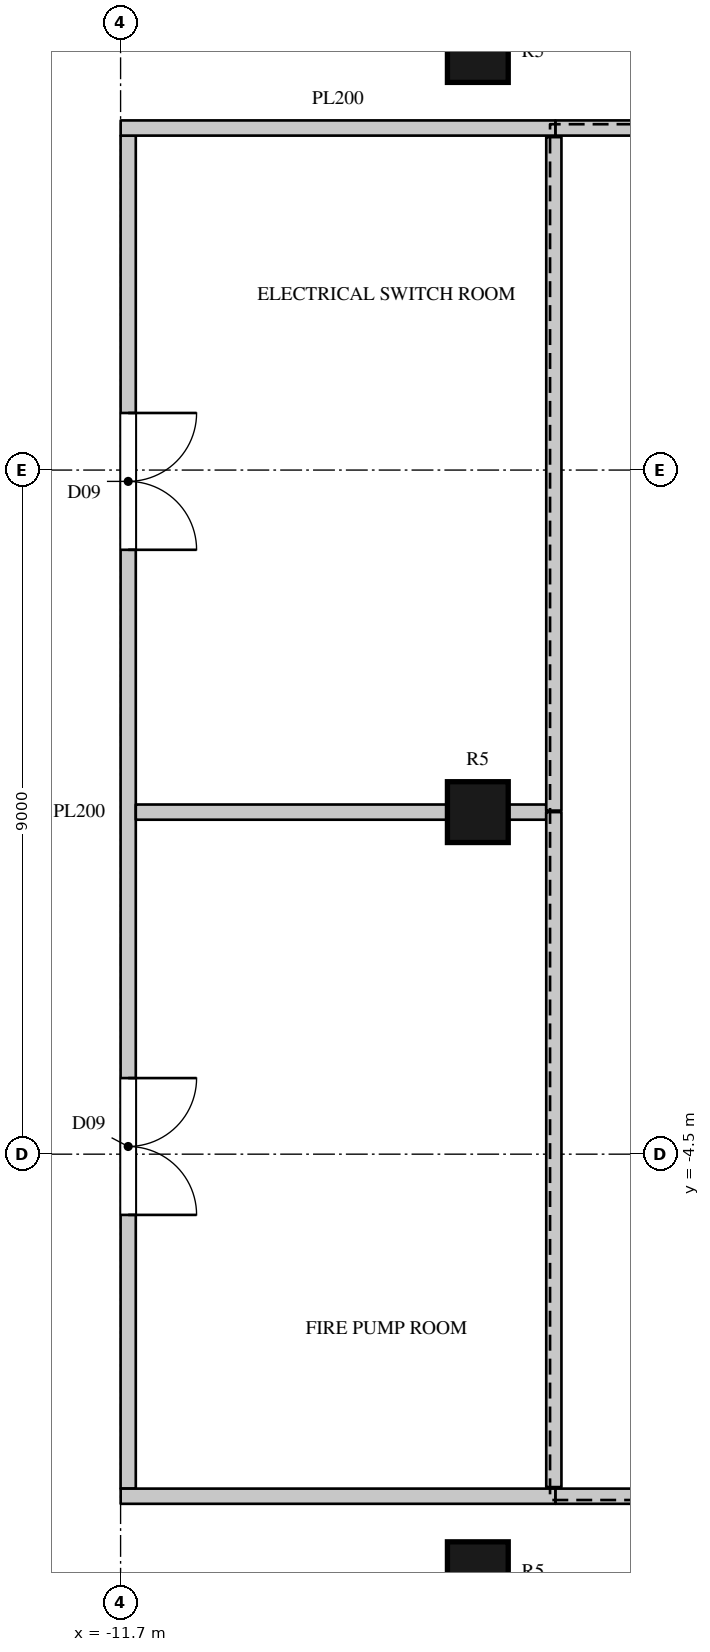
"""IFC4 building model, lengths in metres.
Left out: names, types, materials, properties, quantities, classifications, styles, units other than length and angle.
Written with IfcOpenShell. Run it as: python <this file> out.ifc"""

import sys

from ifc_helpers import new_model, si_unit, direction, frame, frame_2d, origin, origin_2d, place, context, subcontext, project, spatial, rectangle, circle, extrude, element, fill, save


model = new_model("IFC4")
c1 = context("Model", 3, precision=1e-05, world=origin(), true_north=direction((0.0, 1.0)))
c2 = subcontext(c1, "Body", "Model", "MODEL_VIEW")
j1 = project(units=[si_unit("LENGTHUNIT", "METRE"), si_unit("PLANEANGLEUNIT", "RADIAN")], contexts=[c1])
p1 = place(None, origin())
s1 = spatial("IfcSite", under=j1, at=p1, CompositionType="ELEMENT")
p2 = place(p1, origin())
s2 = spatial("IfcBuilding", under=s1, at=p2, CompositionType="ELEMENT")
p3 = place(p2, frame((0.0, 0.0, 347.0)))
s3 = spatial("IfcBuildingStorey", under=s2, at=p3, CompositionType="ELEMENT", Elevation=347.0)
for number, where, z_axis, x_axis in (
    (1, (-7.0, -10.0, 0.0), (0.0, 0.0, 1.0), (1.0, 0.0, 0.0)),
    (2, (-7.0, 0.0, 0.0), (0.0, 0.0, 1.0), (1.0, 0.0, 0.0)),
    (3, (-7.0, 10.0, 0.0), (0.0, 0.0, 1.0), (1.0, 0.0, 0.0)),
):
    element("IfcColumn", number, at=place(p3, frame(where, z_axis=z_axis, x_axis=x_axis)), inside=s3, PredefinedType="COLUMN", context=c2, shape_type="SweptSolid", body=[
        extrude(circle(Radius=0.4, at=origin_2d()), origin(), (0.0, 0.0, 1.0), 4.0),
    ])
for number, where, z_axis, x_axis in (
    (4, (-5.98, -9.0, 0.0), (0.0, 0.0, 1.0), (1.0, 0.0, 0.0)),
    (5, (-5.98, 9.0, 0.0), (0.0, 0.0, 1.0), (1.0, 0.0, 0.0)),
):
    element("IfcWall", number, at=place(p3, frame(where, z_axis=z_axis, x_axis=x_axis)), inside=s3, PredefinedType="PARTITIONING", context=c2, shape_type="SweptSolid", body=[
        extrude(rectangle(XDim=13.96, YDim=0.2, at=frame_2d((6.98, 0.0))), origin(), (0.0, 0.0, 1.0), 3.598),
    ])
p4 = place(p3, frame((-11.6, -8.899, 0.0), z_axis=(0.0, 0.0, 1.0), x_axis=(0.0, 1.0, 0.0)))
e6 = element("IfcWall", 6, at=p4, inside=s3, PredefinedType="PARTITIONING", context=c2, shape_type="SweptSolid", body=[
    extrude(rectangle(XDim=17.798, YDim=0.2, at=frame_2d((8.899, 0.0))), origin(), (0.0, 0.0, 1.0), 3.598),
])
p5 = place(p4, frame((3.6, 0.0, 0.0)))
e7 = element("IfcOpeningElement", 7, at=p5, cuts=e6, PredefinedType="OPENING", context=c2, shape_type="SweptSolid", body=[
    extrude(rectangle(XDim=1.8, YDim=2.4, at=frame_2d((0.9, 1.2))), frame((0.0, 0.11, 0.0), z_axis=(0.0, -1.0, 0.0), x_axis=(1.0, 0.0, 0.0)), (0.0, 0.0, 1.0), 0.22),
])
p6 = place(p4, frame((12.35, 0.0, 0.0)))
e8 = element("IfcOpeningElement", 8, at=p6, cuts=e6, PredefinedType="OPENING", context=c2, shape_type="SweptSolid", body=[
    extrude(rectangle(XDim=1.8, YDim=2.4, at=frame_2d((0.9, 1.2))), frame((0.0, 0.11, 0.0), z_axis=(0.0, -1.0, 0.0), x_axis=(1.0, 0.0, 0.0)), (0.0, 0.0, 1.0), 0.22),
])
p7 = place(p3, frame((-11.5, 0.0, 0.0), z_axis=(0.0, 0.0, 1.0), x_axis=(1.0, 0.0, 0.0)))
e9 = element("IfcWall", 9, at=p7, inside=s3, PredefinedType="PARTITIONING", context=c2, shape_type="SweptSolid", body=[
    extrude(rectangle(XDim=4.1, YDim=0.2, at=frame_2d((2.05, 0.0))), origin(), (0.0, 0.0, 1.0), 3.598),
])
p8 = place(p3, frame((-6.6, 0.0, 0.0), z_axis=(0.0, 0.0, 1.0), x_axis=(1.0, 0.0, 0.0)))
e10 = element("IfcWall", 10, at=p8, inside=s3, PredefinedType="PARTITIONING", context=c2, shape_type="SweptSolid", body=[
    extrude(rectangle(XDim=0.5, YDim=0.2, at=frame_2d((0.25, 0.0))), origin(), (0.0, 0.0, 1.0), 3.598),
])
for number, where, z_axis, x_axis in (
    (11, (-11.699, -9.0, 0.0), (0.0, 0.0, 1.0), (1.0, 0.0, 0.0)),
    (12, (-11.699, 9.0, 0.0), (0.0, 0.0, 1.0), (1.0, 0.0, 0.0)),
):
    element("IfcWall", number, at=place(p3, frame(where, z_axis=z_axis, x_axis=x_axis)), inside=s3, PredefinedType="PARTITIONING", context=c2, shape_type="SweptSolid", body=[
        extrude(rectangle(XDim=5.719, YDim=0.2, at=frame_2d((2.859, 0.0))), origin(), (0.0, 0.0, 1.0), 3.598),
    ])
p9 = place(p3, frame((-6.0, -8.88, 0.0), z_axis=(0.0, 0.0, 1.0), x_axis=(0.0, 1.0, 0.0)))
e13 = element("IfcWall", 13, at=p9, inside=s3, PredefinedType="PARTITIONING", context=c2, shape_type="SweptSolid", body=[
    extrude(rectangle(XDim=8.88, YDim=0.2, at=frame_2d((4.44, 0.0))), origin(), (0.0, 0.0, 1.0), 3.598),
])
p10 = place(p3, frame((-6.0, 0.02, 0.0), z_axis=(0.0, 0.0, 1.0), x_axis=(0.0, 1.0, 0.0)))
e14 = element("IfcWall", 14, at=p10, inside=s3, PredefinedType="PARTITIONING", context=c2, shape_type="SweptSolid", body=[
    extrude(rectangle(XDim=8.86, YDim=0.2, at=frame_2d((4.43, 0.0))), origin(), (0.0, 0.0, 1.0), 3.598),
])
p11 = place(p5, origin())
e15 = element("IfcDoor", 15, at=p11, inside=s3, OperationType="DOUBLE_DOOR_SINGLE_SWING", PredefinedType="DOOR", context=c2, shape_type="SweptSolid", body=[
    extrude(rectangle(XDim=1.8, YDim=2.4, at=frame_2d((0.9, 1.2))), frame((0.0, 0.025, 0.0), z_axis=(0.0, -1.0, 0.0), x_axis=(1.0, 0.0, 0.0)), (0.0, 0.0, 1.0), 0.05),
])
fill(e7, e15)
p12 = place(p6, origin())
e16 = element("IfcDoor", 16, at=p12, inside=s3, OperationType="DOUBLE_DOOR_SINGLE_SWING", PredefinedType="DOOR", context=c2, shape_type="SweptSolid", body=[
    extrude(rectangle(XDim=1.8, YDim=2.4, at=frame_2d((0.9, 1.2))), frame((0.0, 0.025, 0.0), z_axis=(0.0, -1.0, 0.0), x_axis=(1.0, 0.0, 0.0)), (0.0, 0.0, 1.0), 0.05),
])
fill(e8, e16)
save(model, sys.argv[1])
